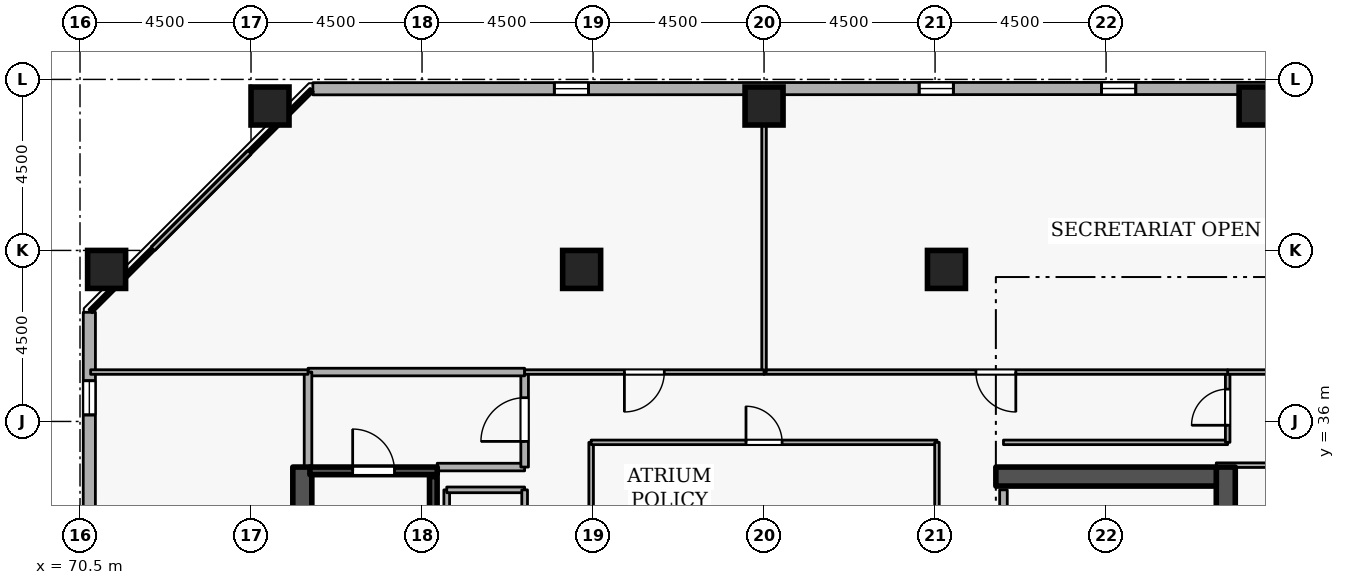
"""IFC4 building model, lengths in metres.
Left out: names, types, materials, properties, quantities, classifications, styles, units other than length and angle.
Written with IfcOpenShell. Run it as: python <this file> out.ifc"""

import sys

from ifc_helpers import new_model, si_unit, direction, frame, frame_2d, origin, origin_2d, place, context, subcontext, project, spatial, rectangle, extrude, element, fill, save


model = new_model("IFC4")
c1 = context("Model", 3, precision=1e-05, world=origin(), true_north=direction((0.0, 1.0)))
c2 = subcontext(c1, "Body", "Model", "MODEL_VIEW")
j1 = project(units=[si_unit("LENGTHUNIT", "METRE"), si_unit("PLANEANGLEUNIT", "RADIAN")], contexts=[c1])
p1 = place(None, origin())
s1 = spatial("IfcSite", under=j1, at=p1, CompositionType="ELEMENT")
p2 = place(p1, origin())
s2 = spatial("IfcBuilding", under=s1, at=p2, CompositionType="ELEMENT")
p3 = place(p2, frame((0.0, 0.0, 233.1)))
s3 = spatial("IfcBuildingStorey", under=s2, at=p3, CompositionType="ELEMENT", Elevation=233.1)
p4 = place(p3, frame((100.65, 19.2, 0.0), z_axis=(0.0, 0.0, 1.0), x_axis=(0.0, 1.0, 0.0)))
e1 = element("IfcWall", 1, at=p4, inside=s3, PredefinedType="SHEAR", context=c2, shape_type="SweptSolid", body=[
    extrude(rectangle(XDim=15.6, YDim=0.5, at=frame_2d((7.8, 0.0))), origin(), (0.0, 0.0, 1.0), 3.6),
])
p5 = place(p3, frame((94.6, 34.55, 0.0), z_axis=(0.0, 0.0, 1.0), x_axis=(1.0, 0.0, 0.0)))
e2 = element("IfcWall", 2, at=p5, inside=s3, PredefinedType="SHEAR", context=c2, shape_type="SweptSolid", body=[
    extrude(rectangle(XDim=5.8, YDim=0.5, at=frame_2d((2.9, 0.0))), origin(), (0.0, 0.0, 1.0), 3.6),
])
p6 = place(p3, frame((76.35, 19.2, 0.0), z_axis=(0.0, 0.0, 1.0), x_axis=(0.0, 1.0, 0.0)))
e3 = element("IfcWall", 3, at=p6, inside=s3, PredefinedType="SHEAR", context=c2, shape_type="SweptSolid", body=[
    extrude(rectangle(XDim=15.6, YDim=0.5, at=frame_2d((7.8, 0.0))), origin(), (0.0, 0.0, 1.0), 3.6),
])
for number, where, z_axis, x_axis in (
    (4, (101.5, 44.3, 0.0), (0.0, 0.0, 1.0), (1.0, 0.0, 0.0)),
    (5, (88.5, 44.3, 0.0), (0.0, 0.0, 1.0), (1.0, 0.0, 0.0)),
    (6, (75.5, 44.3, 0.0), (0.0, 0.0, 1.0), (1.0, 0.0, 0.0)),
    (7, (71.2, 40.0, 0.0), (0.0, 0.0, 1.0), (1.0, 0.0, 0.0)),
    (8, (93.3, 40.0, 0.0), (0.0, 0.0, 1.0), (1.0, 0.0, 0.0)),
    (9, (83.7, 40.0, 0.0), (0.0, 0.0, 1.0), (1.0, 0.0, 0.0)),
):
    element("IfcColumn", number, at=place(p3, frame(where, z_axis=z_axis, x_axis=x_axis)), inside=s3, PredefinedType="COLUMN", context=c2, shape_type="SweptSolid", body=[
        extrude(rectangle(XDim=1.0, YDim=1.0, at=origin_2d()), origin(), (0.0, 0.0, 1.0), 3.6),
    ])
p7 = place(p3, frame((109.681, 44.765, 0.0), z_axis=(0.0, 0.0, 1.0), x_axis=(-0.999999944762, -0.000332378036, 0.0)))
e10 = element("IfcWall", 10, at=p7, inside=s3, PredefinedType="STANDARD", context=c2, shape_type="SweptSolid", body=[
    extrude(rectangle(XDim=33.054, YDim=0.32, at=frame_2d((16.527, 0.0))), origin(), (0.0, 0.0, 1.0), 2.7),
])
p8 = place(p7, frame((1.8, 0.0, 0.72)))
e11 = element("IfcOpeningElement", 11, at=p8, cuts=e10, PredefinedType="OPENING", context=c2, shape_type="SweptSolid", body=[
    extrude(rectangle(XDim=0.9, YDim=1.75, at=frame_2d((0.45, 0.875))), frame((0.0, 0.17, 0.0), z_axis=(0.0, -1.0, 0.0), x_axis=(1.0, 0.0, 0.0)), (0.0, 0.0, 1.0), 0.34),
])
p9 = place(p7, frame((11.4, 0.0, 0.72)))
e12 = element("IfcOpeningElement", 12, at=p9, cuts=e10, PredefinedType="OPENING", context=c2, shape_type="SweptSolid", body=[
    extrude(rectangle(XDim=0.9, YDim=1.75, at=frame_2d((0.45, 0.875))), frame((0.0, 0.17, 0.0), z_axis=(0.0, -1.0, 0.0), x_axis=(1.0, 0.0, 0.0)), (0.0, 0.0, 1.0), 0.34),
])
p10 = place(p7, frame((16.2, 0.0, 0.72)))
e13 = element("IfcOpeningElement", 13, at=p10, cuts=e10, PredefinedType="OPENING", context=c2, shape_type="SweptSolid", body=[
    extrude(rectangle(XDim=0.9, YDim=1.75, at=frame_2d((0.45, 0.875))), frame((0.0, 0.17, 0.0), z_axis=(0.0, -1.0, 0.0), x_axis=(1.0, 0.0, 0.0)), (0.0, 0.0, 1.0), 0.34),
])
p11 = place(p7, frame((25.8, 0.0, 0.72)))
e14 = element("IfcOpeningElement", 14, at=p11, cuts=e10, PredefinedType="OPENING", context=c2, shape_type="SweptSolid", body=[
    extrude(rectangle(XDim=0.9, YDim=1.75, at=frame_2d((0.45, 0.875))), frame((0.0, 0.17, 0.0), z_axis=(0.0, -1.0, 0.0), x_axis=(1.0, 0.0, 0.0)), (0.0, 0.0, 1.0), 0.34),
])
p12 = place(p3, frame((70.746, 38.872, 0.0), z_axis=(0.0, 0.0, 1.0), x_axis=(-0.000332378036, -0.999999944762, 0.0)))
e15 = element("IfcWall", 15, at=p12, inside=s3, PredefinedType="STANDARD", context=c2, shape_type="SweptSolid", body=[
    extrude(rectangle(XDim=33.054, YDim=0.32, at=frame_2d((16.527, 0.0))), origin(), (0.0, 0.0, 1.0), 2.7),
])
p13 = place(p12, frame((1.8, 0.0, 0.72)))
e16 = element("IfcOpeningElement", 16, at=p13, cuts=e15, PredefinedType="OPENING", context=c2, shape_type="SweptSolid", body=[
    extrude(rectangle(XDim=0.9, YDim=1.75, at=frame_2d((0.45, 0.875))), frame((0.0, 0.17, 0.0), z_axis=(0.0, -1.0, 0.0), x_axis=(1.0, 0.0, 0.0)), (0.0, 0.0, 1.0), 0.34),
])
p14 = place(p12, frame((6.6, 0.0, 0.72)))
e17 = element("IfcOpeningElement", 17, at=p14, cuts=e15, PredefinedType="OPENING", context=c2, shape_type="SweptSolid", body=[
    extrude(rectangle(XDim=0.9, YDim=1.75, at=frame_2d((0.45, 0.875))), frame((0.0, 0.17, 0.0), z_axis=(0.0, -1.0, 0.0), x_axis=(1.0, 0.0, 0.0)), (0.0, 0.0, 1.0), 0.34),
])
p15 = place(p12, frame((16.2, 0.0, 0.72)))
e18 = element("IfcOpeningElement", 18, at=p15, cuts=e15, PredefinedType="OPENING", context=c2, shape_type="SweptSolid", body=[
    extrude(rectangle(XDim=0.9, YDim=1.75, at=frame_2d((0.45, 0.875))), frame((0.0, 0.17, 0.0), z_axis=(0.0, -1.0, 0.0), x_axis=(1.0, 0.0, 0.0)), (0.0, 0.0, 1.0), 0.34),
])
p16 = place(p12, frame((21.0, 0.0, 0.72)))
e19 = element("IfcOpeningElement", 19, at=p16, cuts=e15, PredefinedType="OPENING", context=c2, shape_type="SweptSolid", body=[
    extrude(rectangle(XDim=0.9, YDim=1.75, at=frame_2d((0.45, 0.875))), frame((0.0, 0.17, 0.0), z_axis=(0.0, -1.0, 0.0), x_axis=(1.0, 0.0, 0.0)), (0.0, 0.0, 1.0), 0.34),
])
p17 = place(p3, frame((76.55, 34.7, 0.0), z_axis=(0.0, 0.0, 1.0), x_axis=(1.0, 0.0, 0.0)))
e20 = element("IfcWall", 20, at=p17, inside=s3, PredefinedType="SHEAR", context=c2, shape_type="SweptSolid", body=[
    extrude(rectangle(XDim=3.35, YDim=0.2, at=frame_2d((1.675, 0.0))), origin(), (0.0, 0.0, 1.0), 3.6),
])
p18 = place(p17, frame((1.125, 0.0, 0.0)))
e21 = element("IfcOpeningElement", 21, at=p18, cuts=e20, PredefinedType="OPENING", context=c2, shape_type="SweptSolid", body=[
    extrude(rectangle(XDim=1.1, YDim=2.1, at=frame_2d((0.55, 1.05))), frame((0.0, 0.11, 0.0), z_axis=(0.0, -1.0, 0.0), x_axis=(1.0, 0.0, 0.0)), (0.0, 0.0, 1.0), 0.22),
])
p19 = place(p3, frame((79.797, 27.45, 0.0), z_axis=(0.0, 0.0, 1.0), x_axis=(0.0, 1.0, 0.0)))
e22 = element("IfcWall", 22, at=p19, inside=s3, PredefinedType="SHEAR", context=c2, shape_type="SweptSolid", body=[
    extrude(rectangle(XDim=7.1, YDim=0.2, at=frame_2d((3.55, 0.0))), origin(), (0.0, 0.0, 1.0), 3.6),
])
p20 = place(p3, frame((79.9, 34.8, 0.0), z_axis=(0.0, 0.0, 1.0), x_axis=(1.0, 0.0, 0.0)))
e23 = element("IfcWall", 23, at=p20, inside=s3, PredefinedType="STANDARD", context=c2, shape_type="SweptSolid", body=[
    extrude(rectangle(XDim=2.3, YDim=0.2, at=frame_2d((1.15, 0.0))), origin(), (0.0, 0.0, 1.0), 2.545),
])
p21 = place(p3, frame((82.2, 34.8, 0.0), z_axis=(0.0, 0.0, 1.0), x_axis=(0.0, 1.0, 0.0)))
e24 = element("IfcWall", 24, at=p21, inside=s3, PredefinedType="STANDARD", context=c2, shape_type="SweptSolid", body=[
    extrude(rectangle(XDim=2.5, YDim=0.2, at=frame_2d((1.25, 0.0))), origin(), (0.0, 0.0, 1.0), 3.34),
])
p22 = place(p21, frame((0.675, 0.0, 0.0)))
e25 = element("IfcOpeningElement", 25, at=p22, cuts=e24, PredefinedType="OPENING", context=c2, shape_type="SweptSolid", body=[
    extrude(rectangle(XDim=1.15, YDim=2.1, at=frame_2d((0.575, 1.05))), frame((0.0, 0.11, 0.0), z_axis=(0.0, -1.0, 0.0), x_axis=(1.0, 0.0, 0.0)), (0.0, 0.0, 1.0), 0.22),
])
p23 = place(p3, frame((82.2, 37.3, 0.0), z_axis=(0.0, 0.0, 1.0), x_axis=(-1.0, 0.0, 0.0)))
e26 = element("IfcWall", 26, at=p23, inside=s3, PredefinedType="STANDARD", context=c2, shape_type="SweptSolid", body=[
    extrude(rectangle(XDim=5.7, YDim=0.2, at=frame_2d((2.85, 0.0))), origin(), (0.0, 0.0, 1.0), 3.34),
])
p24 = place(p3, frame((76.5, 37.3, 0.0), z_axis=(0.0, 0.0, 1.0), x_axis=(0.0, -1.0, 0.0)))
e27 = element("IfcWall", 27, at=p24, inside=s3, PredefinedType="STANDARD", context=c2, shape_type="SweptSolid", body=[
    extrude(rectangle(XDim=2.5, YDim=0.2, at=frame_2d((1.25, 0.0))), origin(), (0.0, 0.0, 1.0), 3.34),
])
p25 = place(p3, frame((94.8, 32.0, 0.0), z_axis=(0.0, 0.0, 1.0), x_axis=(0.0, 1.0, 0.0)))
e28 = element("IfcWall", 28, at=p25, inside=s3, PredefinedType="STANDARD", context=c2, shape_type="SweptSolid", body=[
    extrude(rectangle(XDim=2.2, YDim=0.2, at=frame_2d((1.1, 0.0))), origin(), (0.0, 0.0, 1.0), 3.34),
])
p26 = place(p25, frame((0.525, 0.0, 0.0)))
e29 = element("IfcOpeningElement", 29, at=p26, cuts=e28, PredefinedType="OPENING", context=c2, shape_type="SweptSolid", body=[
    extrude(rectangle(XDim=1.15, YDim=2.1, at=frame_2d((0.575, 1.05))), frame((0.0, 0.11, 0.0), z_axis=(0.0, -1.0, 0.0), x_axis=(1.0, 0.0, 0.0)), (0.0, 0.0, 1.0), 0.22),
])
p27 = place(p3, frame((80.15, 31.85, 0.0), z_axis=(0.0, 0.0, 1.0), x_axis=(0.0, 1.0, 0.0)))
e30 = element("IfcWall", 30, at=p27, inside=s3, PredefinedType="PARTITIONING", context=c2, shape_type="SweptSolid", body=[
    extrude(rectangle(XDim=2.35, YDim=0.15, at=frame_2d((1.175, 0.0))), origin(), (0.0, 0.0, 1.0), 3.34),
])
p28 = place(p3, frame((80.15, 34.2, 0.0), z_axis=(0.0, 0.0, 1.0), x_axis=(1.0, 0.0, 0.0)))
e31 = element("IfcWall", 31, at=p28, inside=s3, PredefinedType="PARTITIONING", context=c2, shape_type="SweptSolid", body=[
    extrude(rectangle(XDim=2.05, YDim=0.15, at=frame_2d((1.025, 0.0))), origin(), (0.0, 0.0, 1.0), 2.545),
])
p29 = place(p3, frame((82.2, 34.2, 0.0), z_axis=(0.0, 0.0, 1.0), x_axis=(0.0, -1.0, 0.0)))
e32 = element("IfcWall", 32, at=p29, inside=s3, PredefinedType="PARTITIONING", context=c2, shape_type="SweptSolid", body=[
    extrude(rectangle(XDim=2.35, YDim=0.15, at=frame_2d((1.175, 0.0))), origin(), (0.0, 0.0, 1.0), 3.34),
])
p30 = place(p29, frame((0.715, 0.0, 0.0)))
e33 = element("IfcOpeningElement", 33, at=p30, cuts=e32, PredefinedType="OPENING", context=c2, shape_type="SweptSolid", body=[
    extrude(rectangle(XDim=0.92, YDim=2.08, at=frame_2d((0.46, 1.04))), frame((0.0, 0.085, 0.0), z_axis=(0.0, -1.0, 0.0), x_axis=(1.0, 0.0, 0.0)), (0.0, 0.0, 1.0), 0.17),
])
p31 = place(p3, frame((94.8, 35.45, 0.0), z_axis=(0.0, 0.0, 1.0), x_axis=(1.0, 0.0, 0.0)))
e34 = element("IfcWall", 34, at=p31, inside=s3, PredefinedType="PARTITIONING", context=c2, shape_type="SweptSolid", body=[
    extrude(rectangle(XDim=5.9, YDim=0.12, at=frame_2d((2.95, 0.0))), origin(), (0.0, 0.0, 1.0), 3.34),
])
p32 = place(p3, frame((100.7, 35.45, 0.0), z_axis=(0.0, 0.0, 1.0), x_axis=(0.0, 1.0, 0.0)))
e35 = element("IfcWall", 35, at=p32, inside=s3, PredefinedType="PARTITIONING", context=c2, shape_type="SweptSolid", body=[
    extrude(rectangle(XDim=1.85, YDim=0.12, at=frame_2d((0.925, 0.0))), origin(), (0.0, 0.0, 1.0), 3.34),
])
p33 = place(p32, frame((0.45, 0.0, 0.0)))
e36 = element("IfcOpeningElement", 36, at=p33, cuts=e35, PredefinedType="OPENING", context=c2, shape_type="SweptSolid", body=[
    extrude(rectangle(XDim=0.95, YDim=2.1, at=frame_2d((0.475, 1.05))), frame((0.0, 0.07, 0.0), z_axis=(0.0, -1.0, 0.0), x_axis=(1.0, 0.0, 0.0)), (0.0, 0.0, 1.0), 0.14),
])
p34 = place(p3, frame((100.7, 37.3, 0.0), z_axis=(0.0, 0.0, 1.0), x_axis=(1.0, 0.0, 0.0)))
e37 = element("IfcWall", 37, at=p34, inside=s3, PredefinedType="PARTITIONING", context=c2, shape_type="SweptSolid", body=[
    extrude(rectangle(XDim=11.52, YDim=0.12, at=frame_2d((5.76, 0.0))), origin(), (0.0, 0.0, 1.0), 3.34),
])
p35 = place(p3, frame((112.22, 34.85, 0.0), z_axis=(0.0, 0.0, 1.0), x_axis=(-1.0, 0.0, 0.0)))
e38 = element("IfcWall", 38, at=p35, inside=s3, PredefinedType="PARTITIONING", context=c2, shape_type="SweptSolid", body=[
    extrude(rectangle(XDim=11.82, YDim=0.12, at=frame_2d((5.91, 0.0))), origin(), (0.0, 0.0, 1.0), 2.545),
])
p36 = place(p3, frame((100.7, 37.3, 0.0), z_axis=(0.0, 0.0, 1.0), x_axis=(-1.0, 0.0, 0.0)))
e39 = element("IfcWall", 39, at=p36, inside=s3, PredefinedType="PARTITIONING", context=c2, shape_type="SweptSolid", body=[
    extrude(rectangle(XDim=12.2, YDim=0.12, at=frame_2d((6.1, 0.0))), origin(), (0.0, 0.0, 1.0), 3.34),
])
p37 = place(p36, frame((5.575, 0.0, 0.0)))
e40 = element("IfcOpeningElement", 40, at=p37, cuts=e39, PredefinedType="OPENING", context=c2, shape_type="SweptSolid", body=[
    extrude(rectangle(XDim=1.05, YDim=2.1, at=frame_2d((0.525, 1.05))), frame((0.0, 0.07, 0.0), z_axis=(0.0, -1.0, 0.0), x_axis=(1.0, 0.0, 0.0)), (0.0, 0.0, 1.0), 0.14),
])
p38 = place(p3, frame((88.5, 37.3, 0.0), z_axis=(0.0, 0.0, 1.0), x_axis=(0.0, 1.0, 0.0)))
e41 = element("IfcWall", 41, at=p38, inside=s3, PredefinedType="PARTITIONING", context=c2, shape_type="SweptSolid", body=[
    extrude(rectangle(XDim=7.42, YDim=0.12, at=frame_2d((3.71, 0.0))), origin(), (0.0, 0.0, 1.0), 2.932),
])
p39 = place(p3, frame((76.5, 37.3, 0.0), z_axis=(0.0, 0.0, 1.0), x_axis=(-1.0, 0.0, 0.0)))
e42 = element("IfcWall", 42, at=p39, inside=s3, PredefinedType="PARTITIONING", context=c2, shape_type="SweptSolid", body=[
    extrude(rectangle(XDim=5.72, YDim=0.12, at=frame_2d((2.86, 0.0))), origin(), (0.0, 0.0, 1.0), 3.34),
])
p40 = place(p3, frame((70.78, 38.902, 0.0), z_axis=(0.0, 0.0, 1.0), x_axis=(0.707106781187, 0.707106781187, 0.0)))
e43 = element("IfcWall", 43, at=p40, inside=s3, PredefinedType="PARTITIONING", context=c2, shape_type="SweptSolid", body=[
    extrude(rectangle(XDim=8.227, YDim=0.12, at=frame_2d((4.114, 0.0))), origin(), (0.0, 0.0, 1.0), 3.34),
])
p41 = place(p3, frame((88.5, 37.3, 0.0), z_axis=(0.0, 0.0, 1.0), x_axis=(-1.0, 0.0, 0.0)))
e44 = element("IfcWall", 44, at=p41, inside=s3, PredefinedType="PARTITIONING", context=c2, shape_type="SweptSolid", body=[
    extrude(rectangle(XDim=6.3, YDim=0.12, at=frame_2d((3.15, 0.0))), origin(), (0.0, 0.0, 1.0), 3.34),
])
p42 = place(p41, frame((2.625, 0.0, 0.0)))
e45 = element("IfcOpeningElement", 45, at=p42, cuts=e44, PredefinedType="OPENING", context=c2, shape_type="SweptSolid", body=[
    extrude(rectangle(XDim=1.05, YDim=2.1, at=frame_2d((0.525, 1.05))), frame((0.0, 0.07, 0.0), z_axis=(0.0, -1.0, 0.0), x_axis=(1.0, 0.0, 0.0)), (0.0, 0.0, 1.0), 0.14),
])
p43 = place(p3, frame((83.95, 32.2, 0.0), z_axis=(0.0, 0.0, 1.0), x_axis=(0.0, 1.0, 0.0)))
e46 = element("IfcWall", 46, at=p43, inside=s3, PredefinedType="PARTITIONING", context=c2, shape_type="SweptSolid", body=[
    extrude(rectangle(XDim=3.25, YDim=0.12, at=frame_2d((1.625, 0.0))), origin(), (0.0, 0.0, 1.0), 3.34),
])
p44 = place(p3, frame((83.95, 35.45, 0.0), z_axis=(0.0, 0.0, 1.0), x_axis=(1.0, 0.0, 0.0)))
e47 = element("IfcWall", 47, at=p44, inside=s3, PredefinedType="PARTITIONING", context=c2, shape_type="SweptSolid", body=[
    extrude(rectangle(XDim=9.1, YDim=0.12, at=frame_2d((4.55, 0.0))), origin(), (0.0, 0.0, 1.0), 3.34),
])
p45 = place(p44, frame((4.075, 0.0, 0.0)))
e48 = element("IfcOpeningElement", 48, at=p45, cuts=e47, PredefinedType="OPENING", context=c2, shape_type="SweptSolid", body=[
    extrude(rectangle(XDim=0.95, YDim=2.1, at=frame_2d((0.475, 1.05))), frame((0.0, 0.07, 0.0), z_axis=(0.0, -1.0, 0.0), x_axis=(1.0, 0.0, 0.0)), (0.0, 0.0, 1.0), 0.14),
])
p46 = place(p3, frame((93.05, 35.45, 0.0), z_axis=(0.0, 0.0, 1.0), x_axis=(0.0, -1.0, 0.0)))
e49 = element("IfcWall", 49, at=p46, inside=s3, PredefinedType="PARTITIONING", context=c2, shape_type="SweptSolid", body=[
    extrude(rectangle(XDim=3.25, YDim=0.12, at=frame_2d((1.625, 0.0))), origin(), (0.0, 0.0, 1.0), 3.34),
])
p47 = place(p9, origin())
e50 = element("IfcWindow", 50, at=p47, inside=s3, PartitioningType="SINGLE_PANEL", PredefinedType="WINDOW", context=c2, shape_type="SweptSolid", body=[
    extrude(rectangle(XDim=0.9, YDim=1.75, at=frame_2d((0.45, 0.875))), frame((0.0, 0.03, 0.0), z_axis=(0.0, -1.0, 0.0), x_axis=(1.0, 0.0, 0.0)), (0.0, 0.0, 1.0), 0.06),
])
fill(e12, e50)
p48 = place(p10, origin())
e51 = element("IfcWindow", 51, at=p48, inside=s3, PartitioningType="SINGLE_PANEL", PredefinedType="WINDOW", context=c2, shape_type="SweptSolid", body=[
    extrude(rectangle(XDim=0.9, YDim=1.75, at=frame_2d((0.45, 0.875))), frame((0.0, 0.03, 0.0), z_axis=(0.0, -1.0, 0.0), x_axis=(1.0, 0.0, 0.0)), (0.0, 0.0, 1.0), 0.06),
])
fill(e13, e51)
p49 = place(p11, origin())
e52 = element("IfcWindow", 52, at=p49, inside=s3, PartitioningType="SINGLE_PANEL", PredefinedType="WINDOW", context=c2, shape_type="SweptSolid", body=[
    extrude(rectangle(XDim=0.9, YDim=1.75, at=frame_2d((0.45, 0.875))), frame((0.0, 0.03, 0.0), z_axis=(0.0, -1.0, 0.0), x_axis=(1.0, 0.0, 0.0)), (0.0, 0.0, 1.0), 0.06),
])
fill(e14, e52)
p50 = place(p13, origin())
e53 = element("IfcWindow", 53, at=p50, inside=s3, PartitioningType="SINGLE_PANEL", PredefinedType="WINDOW", context=c2, shape_type="SweptSolid", body=[
    extrude(rectangle(XDim=0.9, YDim=1.75, at=frame_2d((0.45, 0.875))), frame((0.0, 0.03, 0.0), z_axis=(0.0, -1.0, 0.0), x_axis=(1.0, 0.0, 0.0)), (0.0, 0.0, 1.0), 0.06),
])
fill(e16, e53)
p51 = place(p18, origin())
e54 = element("IfcDoor", 54, at=p51, inside=s3, OperationType="SINGLE_SWING_LEFT", PredefinedType="DOOR", context=c2, shape_type="SweptSolid", body=[
    extrude(rectangle(XDim=1.1, YDim=2.1, at=frame_2d((0.55, 1.05))), frame((0.0, 0.025, 0.0), z_axis=(0.0, -1.0, 0.0), x_axis=(1.0, 0.0, 0.0)), (0.0, 0.0, 1.0), 0.05),
])
fill(e21, e54)
p52 = place(p22, origin())
e55 = element("IfcDoor", 55, at=p52, inside=s3, OperationType="SINGLE_SWING_LEFT", PredefinedType="DOOR", context=c2, shape_type="SweptSolid", body=[
    extrude(rectangle(XDim=1.15, YDim=2.1, at=frame_2d((0.575, 1.05))), frame((0.0, 0.025, 0.0), z_axis=(0.0, -1.0, 0.0), x_axis=(1.0, 0.0, 0.0)), (0.0, 0.0, 1.0), 0.05),
])
fill(e25, e55)
p53 = place(p33, origin())
e56 = element("IfcDoor", 56, at=p53, inside=s3, OperationType="SINGLE_SWING_LEFT", PredefinedType="DOOR", context=c2, shape_type="SweptSolid", body=[
    extrude(rectangle(XDim=0.95, YDim=2.1, at=frame_2d((0.475, 1.05))), frame((0.0, 0.025, 0.0), z_axis=(0.0, -1.0, 0.0), x_axis=(1.0, 0.0, 0.0)), (0.0, 0.0, 1.0), 0.05),
])
fill(e36, e56)
p54 = place(p37, origin())
e57 = element("IfcDoor", 57, at=p54, inside=s3, OperationType="SINGLE_SWING_LEFT", PredefinedType="DOOR", context=c2, shape_type="SweptSolid", body=[
    extrude(rectangle(XDim=1.05, YDim=2.1, at=frame_2d((0.525, 1.05))), frame((0.0, 0.025, 0.0), z_axis=(0.0, -1.0, 0.0), x_axis=(1.0, 0.0, 0.0)), (0.0, 0.0, 1.0), 0.05),
])
fill(e40, e57)
p55 = place(p42, origin())
e58 = element("IfcDoor", 58, at=p55, inside=s3, OperationType="SINGLE_SWING_RIGHT", PredefinedType="DOOR", context=c2, shape_type="SweptSolid", body=[
    extrude(rectangle(XDim=1.05, YDim=2.1, at=frame_2d((0.525, 1.05))), frame((0.0, 0.025, 0.0), z_axis=(0.0, -1.0, 0.0), x_axis=(1.0, 0.0, 0.0)), (0.0, 0.0, 1.0), 0.05),
])
fill(e45, e58)
p56 = place(p45, origin())
e59 = element("IfcDoor", 59, at=p56, inside=s3, OperationType="SINGLE_SWING_LEFT", PredefinedType="DOOR", context=c2, shape_type="SweptSolid", body=[
    extrude(rectangle(XDim=0.95, YDim=2.1, at=frame_2d((0.475, 1.05))), frame((0.0, 0.025, 0.0), z_axis=(0.0, -1.0, 0.0), x_axis=(1.0, 0.0, 0.0)), (0.0, 0.0, 1.0), 0.05),
])
fill(e48, e59)
save(model, sys.argv[1])
